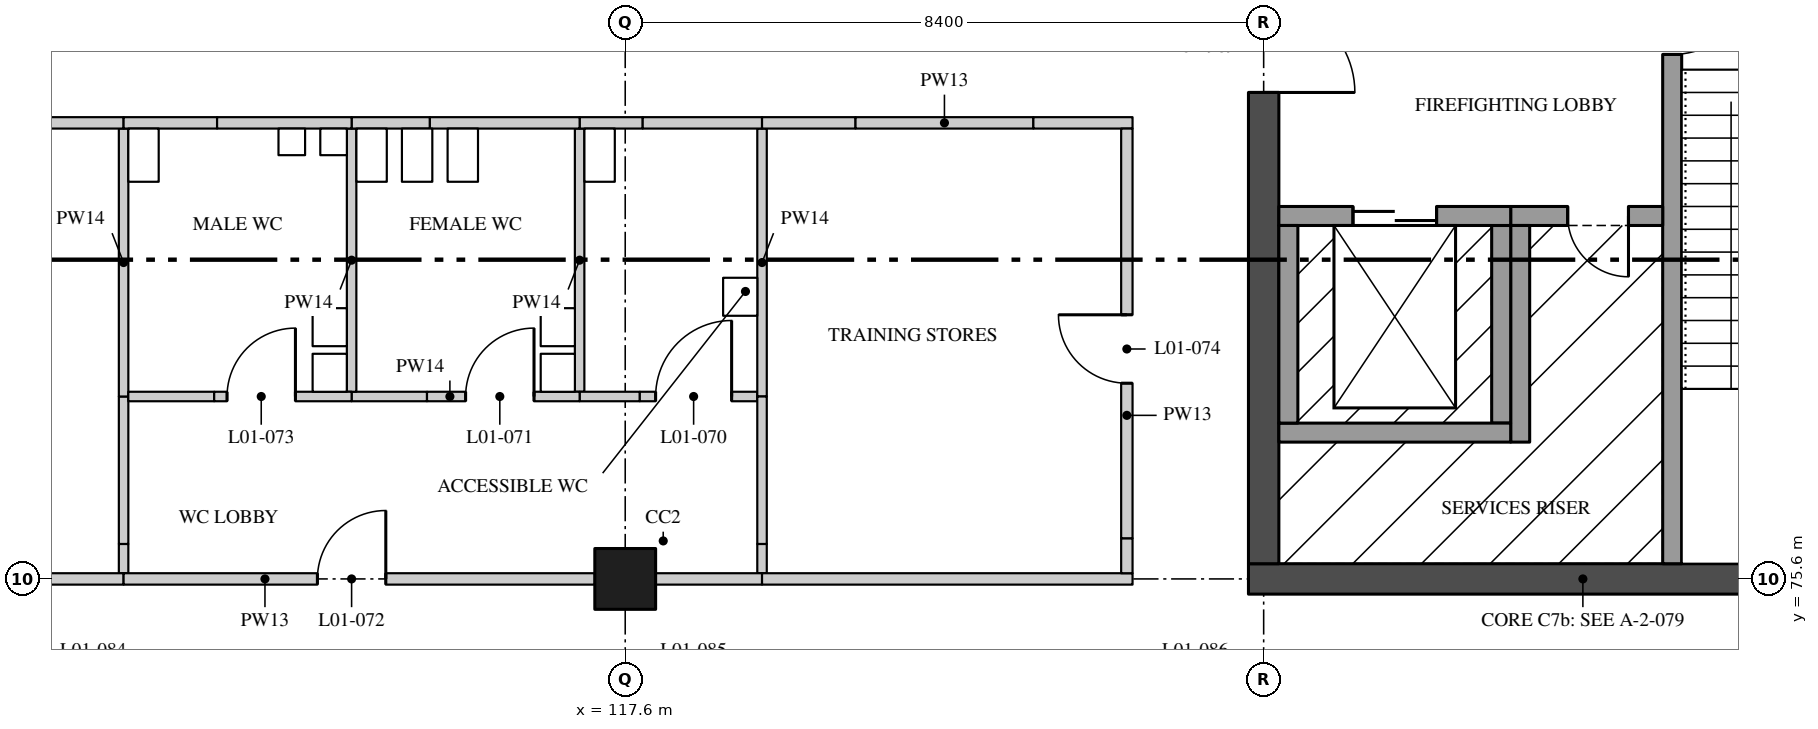
"""IFC4 building model, lengths in metres.
Left out: names, types, materials, properties, quantities, classifications, styles, units other than length and angle.
Written with IfcOpenShell. Run it as: python <this file> out.ifc"""

import sys

from ifc_helpers import new_model, si_unit, direction, frame, frame_2d, origin, origin_2d, place, context, subcontext, project, spatial, rectangle, extrude, element, fill, save


model = new_model("IFC4")
c1 = context("Model", 3, precision=1e-05, world=origin(), true_north=direction((0.0, 1.0)))
c2 = subcontext(c1, "Body", "Model", "MODEL_VIEW")
j1 = project(units=[si_unit("LENGTHUNIT", "METRE"), si_unit("PLANEANGLEUNIT", "RADIAN")], contexts=[c1])
p1 = place(None, origin())
s1 = spatial("IfcSite", under=j1, at=p1, CompositionType="ELEMENT")
p2 = place(p1, origin())
s2 = spatial("IfcBuilding", under=s1, at=p2, CompositionType="ELEMENT")
p3 = place(p2, frame((0.0, 0.0, 5.4)))
s3 = spatial("IfcBuildingStorey", under=s2, at=p3, CompositionType="ELEMENT", Elevation=5.4)
p4 = place(p3, frame((117.6, 75.6, 0.0), z_axis=(0.0, 0.0, 1.0), x_axis=(1.0, 0.0, 0.0)))
e1 = element("IfcColumn", 1, at=p4, inside=s3, PredefinedType="COLUMN", context=c2, shape_type="SweptSolid", body=[
    extrude(rectangle(XDim=0.8, YDim=0.8, at=origin_2d()), origin(), (0.0, 0.0, 1.0), 4.37),
])
p5 = place(p3, frame((125.8, 75.6, 0.0), z_axis=(0.0, 0.0, 1.0), x_axis=(1.0, 0.0, 0.0)))
e2 = element("IfcWall", 2, at=p5, inside=s3, PredefinedType="SHEAR", context=c2, shape_type="SweptSolid", body=[
    extrude(rectangle(XDim=8.8, YDim=0.4, at=frame_2d((4.4, 0.0))), origin(), (0.0, 0.0, 1.0), 4.37),
])
p6 = place(p3, frame((126.0, 75.8, 0.0), z_axis=(0.0, 0.0, 1.0), x_axis=(0.0, 1.0, 0.0)))
e3 = element("IfcWall", 3, at=p6, inside=s3, PredefinedType="SHEAR", context=c2, shape_type="SweptSolid", body=[
    extrude(rectangle(XDim=8.0, YDim=0.4, at=frame_2d((4.0, 0.0))), origin(), (0.0, 0.0, 1.0), 4.37),
])
p7 = place(p6, frame((6.2, 0.0, 0.0)))
e4 = element("IfcOpeningElement", 4, at=p7, cuts=e3, PredefinedType="OPENING", context=c2, shape_type="SweptSolid", body=[
    extrude(rectangle(XDim=1.2, YDim=2.1, at=frame_2d((0.6, 1.05))), frame((0.0, 0.21, 0.0), z_axis=(0.0, -1.0, 0.0), x_axis=(1.0, 0.0, 0.0)), (0.0, 0.0, 1.0), 0.42),
])
p8 = place(p3, frame((131.375, 83.8, 0.0), z_axis=(0.0, 0.0, 1.0), x_axis=(0.0, -1.0, 0.0)))
e5 = element("IfcWall", 5, at=p8, inside=s3, PredefinedType="SOLIDWALL", context=c2, shape_type="SweptSolid", body=[
    extrude(rectangle(XDim=8.0, YDim=0.25, at=frame_2d((4.0, 0.0))), origin(), (0.0, 0.0, 1.0), 4.37),
])
p9 = place(p8, frame((0.2, 0.0, 0.0)))
e6 = element("IfcOpeningElement", 6, at=p9, cuts=e5, PredefinedType="OPENING", context=c2, shape_type="SweptSolid", body=[
    extrude(rectangle(XDim=1.1, YDim=2.1, at=frame_2d((0.55, 1.05))), frame((0.0, 0.135, 0.0), z_axis=(0.0, -1.0, 0.0), x_axis=(1.0, 0.0, 0.0)), (0.0, 0.0, 1.0), 0.27),
])
p10 = place(p3, frame((131.25, 80.375, 0.0), z_axis=(0.0, 0.0, 1.0), x_axis=(-1.0, 0.0, 0.0)))
e7 = element("IfcWall", 7, at=p10, inside=s3, PredefinedType="SOLIDWALL", context=c2, shape_type="SweptSolid", body=[
    extrude(rectangle(XDim=2.0, YDim=0.25, at=frame_2d((1.0, 0.0))), origin(), (0.0, 0.0, 1.0), 4.37),
])
p11 = place(p10, frame((0.45, 0.0, 0.0)))
e8 = element("IfcOpeningElement", 8, at=p11, cuts=e7, PredefinedType="OPENING", context=c2, shape_type="SweptSolid", body=[
    extrude(rectangle(XDim=0.8, YDim=2.1, at=frame_2d((0.4, 1.05))), frame((0.0, 0.135, 0.0), z_axis=(0.0, -1.0, 0.0), x_axis=(1.0, 0.0, 0.0)), (0.0, 0.0, 1.0), 0.27),
])
p12 = place(p3, frame((129.375, 80.25, 0.0), z_axis=(0.0, 0.0, 1.0), x_axis=(0.0, -1.0, 0.0)))
e9 = element("IfcWall", 9, at=p12, inside=s3, PredefinedType="SOLIDWALL", context=c2, shape_type="SweptSolid", body=[
    extrude(rectangle(XDim=2.85, YDim=0.25, at=frame_2d((1.425, 0.0))), origin(), (0.0, 0.0, 1.0), 4.37),
])
p13 = place(p3, frame((129.125, 77.65, 0.0), z_axis=(0.0, 0.0, 1.0), x_axis=(0.0, 1.0, 0.0)))
e10 = element("IfcWall", 10, at=p13, inside=s3, PredefinedType="SOLIDWALL", context=c2, shape_type="SweptSolid", body=[
    extrude(rectangle(XDim=2.6, YDim=0.25, at=frame_2d((1.3, 0.0))), origin(), (0.0, 0.0, 1.0), 4.37),
])
p14 = place(p3, frame((126.2, 80.375, 0.0), z_axis=(0.0, 0.0, 1.0), x_axis=(1.0, 0.0, 0.0)))
e11 = element("IfcWall", 11, at=p14, inside=s3, PredefinedType="SOLIDWALL", context=c2, shape_type="SweptSolid", body=[
    extrude(rectangle(XDim=3.05, YDim=0.25, at=frame_2d((1.525, 0.0))), origin(), (0.0, 0.0, 1.0), 4.37),
])
p15 = place(p14, frame((0.975, 0.0, 0.0)))
e12 = element("IfcOpeningElement", 12, at=p15, cuts=e11, PredefinedType="OPENING", context=c2, shape_type="SweptSolid", body=[
    extrude(rectangle(XDim=1.1, YDim=2.1, at=frame_2d((0.55, 1.05))), frame((0.0, 0.135, 0.0), z_axis=(0.0, -1.0, 0.0), x_axis=(1.0, 0.0, 0.0)), (0.0, 0.0, 1.0), 0.27),
])
p16 = place(p3, frame((126.2, 77.525, 0.0), z_axis=(0.0, 0.0, 1.0), x_axis=(1.0, 0.0, 0.0)))
e13 = element("IfcWall", 13, at=p16, inside=s3, PredefinedType="SOLIDWALL", context=c2, shape_type="SweptSolid", body=[
    extrude(rectangle(XDim=3.05, YDim=0.25, at=frame_2d((1.525, 0.0))), origin(), (0.0, 0.0, 1.0), 4.37),
])
p17 = place(p3, frame((126.325, 77.65, 0.0), z_axis=(0.0, 0.0, 1.0), x_axis=(0.0, 1.0, 0.0)))
e14 = element("IfcWall", 14, at=p17, inside=s3, PredefinedType="SOLIDWALL", context=c2, shape_type="SweptSolid", body=[
    extrude(rectangle(XDim=2.6, YDim=0.25, at=frame_2d((1.3, 0.0))), origin(), (0.0, 0.0, 1.0), 4.37),
])
p18 = place(p3, frame((111.0, 75.675, 0.0), z_axis=(0.0, 0.0, 1.0), x_axis=(0.0, 1.0, 0.0)))
e15 = element("IfcWall", 15, at=p18, inside=s3, PredefinedType="PARTITIONING", context=c2, shape_type="SweptSolid", body=[
    extrude(rectangle(XDim=0.385, YDim=0.125, at=frame_2d((0.192, 0.0))), origin(), (0.0, 0.0, 1.0), 3.746),
])
p19 = place(p3, frame((111.0, 76.06, 0.0), z_axis=(0.0, 0.0, 1.0), x_axis=(0.0, 1.0, 0.0)))
e16 = element("IfcWall", 16, at=p19, inside=s3, PredefinedType="PARTITIONING", context=c2, shape_type="SweptSolid", body=[
    extrude(rectangle(XDim=1.94, YDim=0.125, at=frame_2d((0.97, 0.0))), origin(), (0.0, 0.0, 1.0), 4.37),
])
p20 = place(p3, frame((111.0, 78.0, 0.0), z_axis=(0.0, 0.0, 1.0), x_axis=(0.0, 1.0, 0.0)))
e17 = element("IfcWall", 17, at=p20, inside=s3, PredefinedType="PARTITIONING", context=c2, shape_type="SweptSolid", body=[
    extrude(rectangle(XDim=3.525, YDim=0.125, at=frame_2d((1.762, 0.0))), origin(), (0.0, 0.0, 1.0), 4.37),
])
p21 = place(p3, frame((109.6, 75.6, 0.0), z_axis=(0.0, 0.0, 1.0), x_axis=(1.0, 0.0, 0.0)))
e18 = element("IfcWall", 18, at=p21, inside=s3, PredefinedType="PARTITIONING", context=c2, shape_type="SweptSolid", body=[
    extrude(rectangle(XDim=1.4, YDim=0.15, at=frame_2d((0.7, 0.0))), origin(), (0.0, 0.0, 1.0), 3.746),
])
p22 = place(p3, frame((109.43, 81.6, 0.0), z_axis=(0.0, 0.0, 1.0), x_axis=(1.0, 0.0, 0.0)))
e19 = element("IfcWall", 19, at=p22, inside=s3, PredefinedType="PARTITIONING", context=c2, shape_type="SweptSolid", body=[
    extrude(rectangle(XDim=1.57, YDim=0.15, at=frame_2d((0.785, 0.0))), origin(), (0.0, 0.0, 1.0), 4.37),
])
p23 = place(p3, frame((117.0, 78.062, 0.0), z_axis=(0.0, 0.0, 1.0), x_axis=(0.0, 1.0, 0.0)))
e20 = element("IfcWall", 20, at=p23, inside=s3, PredefinedType="PARTITIONING", context=c2, shape_type="SweptSolid", body=[
    extrude(rectangle(XDim=3.463, YDim=0.125, at=frame_2d((1.731, 0.0))), origin(), (0.0, 0.0, 1.0), 4.37),
])
p24 = place(p3, frame((117.0, 78.0, 0.0), z_axis=(0.0, 0.0, 1.0), x_axis=(1.0, 0.0, 0.0)))
e21 = element("IfcWall", 21, at=p24, inside=s3, PredefinedType="PARTITIONING", context=c2, shape_type="SweptSolid", body=[
    extrude(rectangle(XDim=0.792, YDim=0.125, at=frame_2d((0.396, 0.0))), origin(), (0.0, 0.0, 1.0), 3.746),
])
p25 = place(p3, frame((117.792, 78.0, 0.0), z_axis=(0.0, 0.0, 1.0), x_axis=(1.0, 0.0, 0.0)))
e22 = element("IfcWall", 22, at=p25, inside=s3, PredefinedType="PARTITIONING", context=c2, shape_type="SweptSolid", body=[
    extrude(rectangle(XDim=1.546, YDim=0.125, at=frame_2d((0.773, 0.0))), origin(), (0.0, 0.0, 1.0), 4.37),
])
p26 = place(p25, frame((0.208, 0.0, 0.0)))
e23 = element("IfcOpeningElement", 23, at=p26, cuts=e22, PredefinedType="OPENING", context=c2, shape_type="SweptSolid", body=[
    extrude(rectangle(XDim=1.0, YDim=2.1, at=frame_2d((0.5, 1.05))), frame((0.0, 0.073, 0.0), z_axis=(0.0, -1.0, 0.0), x_axis=(1.0, 0.0, 0.0)), (0.0, 0.0, 1.0), 0.145),
])
p27 = place(p3, frame((119.4, 78.0, 0.0), z_axis=(0.0, 0.0, 1.0), x_axis=(0.0, 1.0, 0.0)))
e24 = element("IfcWall", 24, at=p27, inside=s3, PredefinedType="PARTITIONING", context=c2, shape_type="SweptSolid", body=[
    extrude(rectangle(XDim=3.525, YDim=0.125, at=frame_2d((1.762, 0.0))), origin(), (0.0, 0.0, 1.0), 4.37),
])
p28 = place(p3, frame((117.0, 81.6, 0.0), z_axis=(0.0, 0.0, 1.0), x_axis=(1.0, 0.0, 0.0)))
e25 = element("IfcWall", 25, at=p28, inside=s3, PredefinedType="PARTITIONING", context=c2, shape_type="SweptSolid", body=[
    extrude(rectangle(XDim=0.83, YDim=0.15, at=frame_2d((0.415, 0.0))), origin(), (0.0, 0.0, 1.0), 3.746),
])
p29 = place(p3, frame((117.83, 81.6, 0.0), z_axis=(0.0, 0.0, 1.0), x_axis=(1.0, 0.0, 0.0)))
e26 = element("IfcWall", 26, at=p29, inside=s3, PredefinedType="PARTITIONING", context=c2, shape_type="SweptSolid", body=[
    extrude(rectangle(XDim=1.57, YDim=0.15, at=frame_2d((0.785, 0.0))), origin(), (0.0, 0.0, 1.0), 4.37),
])
p30 = place(p3, frame((114.0, 78.0, 0.0), z_axis=(0.0, 0.0, 1.0), x_axis=(1.0, 0.0, 0.0)))
e27 = element("IfcWall", 27, at=p30, inside=s3, PredefinedType="PARTITIONING", context=c2, shape_type="SweptSolid", body=[
    extrude(rectangle(XDim=0.992, YDim=0.125, at=frame_2d((0.496, 0.0))), origin(), (0.0, 0.0, 1.0), 3.895),
])
p31 = place(p3, frame((114.992, 78.0, 0.0), z_axis=(0.0, 0.0, 1.0), x_axis=(1.0, 0.0, 0.0)))
e28 = element("IfcWall", 28, at=p31, inside=s3, PredefinedType="PARTITIONING", context=c2, shape_type="SweptSolid", body=[
    extrude(rectangle(XDim=2.008, YDim=0.125, at=frame_2d((1.004, 0.0))), origin(), (0.0, 0.0, 1.0), 4.37),
])
p32 = place(p31, frame((0.508, 0.0, 0.0)))
e29 = element("IfcOpeningElement", 29, at=p32, cuts=e28, PredefinedType="OPENING", context=c2, shape_type="SweptSolid", body=[
    extrude(rectangle(XDim=0.9, YDim=2.1, at=frame_2d((0.45, 1.05))), frame((0.0, 0.073, 0.0), z_axis=(0.0, -1.0, 0.0), x_axis=(1.0, 0.0, 0.0)), (0.0, 0.0, 1.0), 0.145),
])
p33 = place(p3, frame((114.0, 78.062, 0.0), z_axis=(0.0, 0.0, 1.0), x_axis=(0.0, 1.0, 0.0)))
e30 = element("IfcWall", 30, at=p33, inside=s3, PredefinedType="PARTITIONING", context=c2, shape_type="SweptSolid", body=[
    extrude(rectangle(XDim=3.463, YDim=0.125, at=frame_2d((1.731, 0.0))), origin(), (0.0, 0.0, 1.0), 4.37),
])
p34 = place(p3, frame((114.0, 81.6, 0.0), z_axis=(0.0, 0.0, 1.0), x_axis=(1.0, 0.0, 0.0)))
e31 = element("IfcWall", 31, at=p34, inside=s3, PredefinedType="PARTITIONING", context=c2, shape_type="SweptSolid", body=[
    extrude(rectangle(XDim=1.03, YDim=0.15, at=frame_2d((0.515, 0.0))), origin(), (0.0, 0.0, 1.0), 3.895),
])
p35 = place(p3, frame((115.03, 81.6, 0.0), z_axis=(0.0, 0.0, 1.0), x_axis=(1.0, 0.0, 0.0)))
e32 = element("IfcWall", 32, at=p35, inside=s3, PredefinedType="PARTITIONING", context=c2, shape_type="SweptSolid", body=[
    extrude(rectangle(XDim=1.97, YDim=0.15, at=frame_2d((0.985, 0.0))), origin(), (0.0, 0.0, 1.0), 4.37),
])
p36 = place(p3, frame((111.062, 78.0, 0.0), z_axis=(0.0, 0.0, 1.0), x_axis=(1.0, 0.0, 0.0)))
e33 = element("IfcWall", 33, at=p36, inside=s3, PredefinedType="PARTITIONING", context=c2, shape_type="SweptSolid", body=[
    extrude(rectangle(XDim=1.13, YDim=0.125, at=frame_2d((0.565, 0.0))), origin(), (0.0, 0.0, 1.0), 3.895),
])
p37 = place(p3, frame((112.192, 78.0, 0.0), z_axis=(0.0, 0.0, 1.0), x_axis=(1.0, 0.0, 0.0)))
e34 = element("IfcWall", 34, at=p37, inside=s3, PredefinedType="PARTITIONING", context=c2, shape_type="SweptSolid", body=[
    extrude(rectangle(XDim=1.808, YDim=0.125, at=frame_2d((0.904, 0.0))), origin(), (0.0, 0.0, 1.0), 4.37),
])
p38 = place(p37, frame((0.169, 0.0, 0.0)))
e35 = element("IfcOpeningElement", 35, at=p38, cuts=e34, PredefinedType="OPENING", context=c2, shape_type="SweptSolid", body=[
    extrude(rectangle(XDim=0.9, YDim=2.1, at=frame_2d((0.45, 1.05))), frame((0.0, 0.073, 0.0), z_axis=(0.0, -1.0, 0.0), x_axis=(1.0, 0.0, 0.0)), (0.0, 0.0, 1.0), 0.145),
])
p39 = place(p3, frame((119.4, 75.675, 0.0), z_axis=(0.0, 0.0, 1.0), x_axis=(0.0, 1.0, 0.0)))
e36 = element("IfcWall", 36, at=p39, inside=s3, PredefinedType="PARTITIONING", context=c2, shape_type="SweptSolid", body=[
    extrude(rectangle(XDim=0.385, YDim=0.125, at=frame_2d((0.192, 0.0))), origin(), (0.0, 0.0, 1.0), 3.746),
])
p40 = place(p3, frame((119.4, 76.06, 0.0), z_axis=(0.0, 0.0, 1.0), x_axis=(0.0, 1.0, 0.0)))
e37 = element("IfcWall", 37, at=p40, inside=s3, PredefinedType="PARTITIONING", context=c2, shape_type="SweptSolid", body=[
    extrude(rectangle(XDim=1.94, YDim=0.125, at=frame_2d((0.97, 0.0))), origin(), (0.0, 0.0, 1.0), 4.37),
])
p41 = place(p3, frame((111.0, 75.6, 0.0), z_axis=(0.0, 0.0, 1.0), x_axis=(1.0, 0.0, 0.0)))
e38 = element("IfcWall", 38, at=p41, inside=s3, PredefinedType="PARTITIONING", context=c2, shape_type="SweptSolid", body=[
    extrude(rectangle(XDim=6.2, YDim=0.15, at=frame_2d((3.1, 0.0))), origin(), (0.0, 0.0, 1.0), 3.746),
])
p42 = place(p41, frame((2.55, 0.0, 0.0)))
e39 = element("IfcOpeningElement", 39, at=p42, cuts=e38, PredefinedType="OPENING", context=c2, shape_type="SweptSolid", body=[
    extrude(rectangle(XDim=0.9, YDim=2.1, at=frame_2d((0.45, 1.05))), frame((0.0, 0.085, 0.0), z_axis=(0.0, -1.0, 0.0), x_axis=(1.0, 0.0, 0.0)), (0.0, 0.0, 1.0), 0.17),
])
p43 = place(p3, frame((118.0, 75.6, 0.0), z_axis=(0.0, 0.0, 1.0), x_axis=(1.0, 0.0, 0.0)))
e40 = element("IfcWall", 40, at=p43, inside=s3, PredefinedType="PARTITIONING", context=c2, shape_type="SweptSolid", body=[
    extrude(rectangle(XDim=1.4, YDim=0.15, at=frame_2d((0.7, 0.0))), origin(), (0.0, 0.0, 1.0), 3.746),
])
p44 = place(p3, frame((111.0, 81.6, 0.0), z_axis=(0.0, 0.0, 1.0), x_axis=(1.0, 0.0, 0.0)))
e41 = element("IfcWall", 41, at=p44, inside=s3, PredefinedType="PARTITIONING", context=c2, shape_type="SweptSolid", body=[
    extrude(rectangle(XDim=1.23, YDim=0.15, at=frame_2d((0.615, 0.0))), origin(), (0.0, 0.0, 1.0), 3.895),
])
p45 = place(p3, frame((112.23, 81.6, 0.0), z_axis=(0.0, 0.0, 1.0), x_axis=(1.0, 0.0, 0.0)))
e42 = element("IfcWall", 42, at=p45, inside=s3, PredefinedType="PARTITIONING", context=c2, shape_type="SweptSolid", body=[
    extrude(rectangle(XDim=1.77, YDim=0.15, at=frame_2d((0.885, 0.0))), origin(), (0.0, 0.0, 1.0), 4.37),
])
p46 = place(p3, frame((119.4, 75.6, 0.0), z_axis=(0.0, 0.0, 1.0), x_axis=(1.0, 0.0, 0.0)))
e43 = element("IfcWall", 43, at=p46, inside=s3, PredefinedType="PARTITIONING", context=c2, shape_type="SweptSolid", body=[
    extrude(rectangle(XDim=4.875, YDim=0.15, at=frame_2d((2.438, 0.0))), origin(), (0.0, 0.0, 1.0), 3.746),
])
p47 = place(p3, frame((119.4, 81.6, 0.0), z_axis=(0.0, 0.0, 1.0), x_axis=(1.0, 0.0, 0.0)))
e44 = element("IfcWall", 44, at=p47, inside=s3, PredefinedType="PARTITIONING", context=c2, shape_type="SweptSolid", body=[
    extrude(rectangle(XDim=1.23, YDim=0.15, at=frame_2d((0.615, 0.0))), origin(), (0.0, 0.0, 1.0), 3.895),
])
p48 = place(p3, frame((120.63, 81.6, 0.0), z_axis=(0.0, 0.0, 1.0), x_axis=(1.0, 0.0, 0.0)))
e45 = element("IfcWall", 45, at=p48, inside=s3, PredefinedType="PARTITIONING", context=c2, shape_type="SweptSolid", body=[
    extrude(rectangle(XDim=2.34, YDim=0.15, at=frame_2d((1.17, 0.0))), origin(), (0.0, 0.0, 1.0), 4.37),
])
p49 = place(p3, frame((122.97, 81.6, 0.0), z_axis=(0.0, 0.0, 1.0), x_axis=(1.0, 0.0, 0.0)))
e46 = element("IfcWall", 46, at=p49, inside=s3, PredefinedType="PARTITIONING", context=c2, shape_type="SweptSolid", body=[
    extrude(rectangle(XDim=1.305, YDim=0.15, at=frame_2d((0.652, 0.0))), origin(), (0.0, 0.0, 1.0), 3.895),
])
p50 = place(p3, frame((124.2, 75.675, 0.0), z_axis=(0.0, 0.0, 1.0), x_axis=(0.0, 1.0, 0.0)))
e47 = element("IfcWall", 47, at=p50, inside=s3, PredefinedType="PARTITIONING", context=c2, shape_type="SweptSolid", body=[
    extrude(rectangle(XDim=0.46, YDim=0.15, at=frame_2d((0.23, 0.0))), origin(), (0.0, 0.0, 1.0), 3.746),
])
p51 = place(p3, frame((124.2, 76.135, 0.0), z_axis=(0.0, 0.0, 1.0), x_axis=(0.0, 1.0, 0.0)))
e48 = element("IfcWall", 48, at=p51, inside=s3, PredefinedType="PARTITIONING", context=c2, shape_type="SweptSolid", body=[
    extrude(rectangle(XDim=5.39, YDim=0.15, at=frame_2d((2.695, 0.0))), origin(), (0.0, 0.0, 1.0), 4.37),
])
p52 = place(p51, frame((2.04, 0.0, 0.0)))
e49 = element("IfcOpeningElement", 49, at=p52, cuts=e48, PredefinedType="OPENING", context=c2, shape_type="SweptSolid", body=[
    extrude(rectangle(XDim=0.9, YDim=2.1, at=frame_2d((0.45, 1.05))), frame((0.0, 0.085, 0.0), z_axis=(0.0, -1.0, 0.0), x_axis=(1.0, 0.0, 0.0)), (0.0, 0.0, 1.0), 0.17),
])
p53 = place(p7, frame((1.2, 0.0, 0.0), z_axis=(0.0, 0.0, 1.0), x_axis=(-1.0, 0.0, 0.0)))
e50 = element("IfcDoor", 50, at=p53, inside=s3, OperationType="SINGLE_SWING_LEFT", PredefinedType="DOOR", context=c2, shape_type="SweptSolid", body=[
    extrude(rectangle(XDim=1.2, YDim=2.1, at=frame_2d((0.6, 1.05))), frame((0.0, 0.035, 0.0), z_axis=(0.0, -1.0, 0.0), x_axis=(1.0, 0.0, 0.0)), (0.0, 0.0, 1.0), 0.07),
])
fill(e4, e50)
p54 = place(p11, origin())
e51 = element("IfcDoor", 51, at=p54, inside=s3, OperationType="SINGLE_SWING_RIGHT", PredefinedType="DOOR", context=c2, shape_type="SweptSolid", body=[
    extrude(rectangle(XDim=0.8, YDim=2.1, at=frame_2d((0.4, 1.05))), frame((0.0, 0.035, 0.0), z_axis=(0.0, -1.0, 0.0), x_axis=(1.0, 0.0, 0.0)), (0.0, 0.0, 1.0), 0.07),
])
fill(e8, e51)
p55 = place(p9, origin())
e52 = element("IfcDoor", 52, at=p55, inside=s3, OperationType="SINGLE_SWING_RIGHT", PredefinedType="DOOR", context=c2, shape_type="SweptSolid", body=[
    extrude(rectangle(XDim=1.1, YDim=2.1, at=frame_2d((0.55, 1.05))), frame((0.0, 0.035, 0.0), z_axis=(0.0, -1.0, 0.0), x_axis=(1.0, 0.0, 0.0)), (0.0, 0.0, 1.0), 0.07),
])
fill(e6, e52)
p56 = place(p15, origin())
e53 = element("IfcDoor", 53, at=p56, inside=s3, OperationType="DOUBLE_DOOR_SLIDING", PredefinedType="DOOR", context=c2, shape_type="SweptSolid", body=[
    extrude(rectangle(XDim=1.1, YDim=2.1, at=frame_2d((0.55, 1.05))), frame((0.0, 0.04, 0.0), z_axis=(0.0, -1.0, 0.0), x_axis=(1.0, 0.0, 0.0)), (0.0, 0.0, 1.0), 0.08),
])
fill(e12, e53)
p57 = place(p26, origin())
e54 = element("IfcDoor", 54, at=p57, inside=s3, OperationType="SINGLE_SWING_LEFT", PredefinedType="DOOR", context=c2, shape_type="SweptSolid", body=[
    extrude(rectangle(XDim=1.0, YDim=2.1, at=frame_2d((0.5, 1.05))), frame((0.0, 0.02, 0.0), z_axis=(0.0, -1.0, 0.0), x_axis=(1.0, 0.0, 0.0)), (0.0, 0.0, 1.0), 0.04),
])
fill(e23, e54)
p58 = place(p32, origin())
e55 = element("IfcDoor", 55, at=p58, inside=s3, OperationType="SINGLE_SWING_LEFT", PredefinedType="DOOR", context=c2, shape_type="SweptSolid", body=[
    extrude(rectangle(XDim=0.9, YDim=2.1, at=frame_2d((0.45, 1.05))), frame((0.0, 0.02, 0.0), z_axis=(0.0, -1.0, 0.0), x_axis=(1.0, 0.0, 0.0)), (0.0, 0.0, 1.0), 0.04),
])
fill(e29, e55)
p59 = place(p42, origin())
e56 = element("IfcDoor", 56, at=p59, inside=s3, OperationType="SINGLE_SWING_LEFT", PredefinedType="DOOR", context=c2, shape_type="SweptSolid", body=[
    extrude(rectangle(XDim=0.9, YDim=2.1, at=frame_2d((0.45, 1.05))), frame((0.0, 0.025, 0.0), z_axis=(0.0, -1.0, 0.0), x_axis=(1.0, 0.0, 0.0)), (0.0, 0.0, 1.0), 0.05),
])
fill(e39, e56)
p60 = place(p38, origin())
e57 = element("IfcDoor", 57, at=p60, inside=s3, OperationType="SINGLE_SWING_LEFT", PredefinedType="DOOR", context=c2, shape_type="SweptSolid", body=[
    extrude(rectangle(XDim=0.9, YDim=2.1, at=frame_2d((0.45, 1.05))), frame((0.0, 0.02, 0.0), z_axis=(0.0, -1.0, 0.0), x_axis=(1.0, 0.0, 0.0)), (0.0, 0.0, 1.0), 0.04),
])
fill(e35, e57)
p61 = place(p52, origin())
e58 = element("IfcDoor", 58, at=p61, inside=s3, OperationType="SINGLE_SWING_LEFT", PredefinedType="DOOR", context=c2, shape_type="SweptSolid", body=[
    extrude(rectangle(XDim=0.9, YDim=2.1, at=frame_2d((0.45, 1.05))), frame((0.0, 0.025, 0.0), z_axis=(0.0, -1.0, 0.0), x_axis=(1.0, 0.0, 0.0)), (0.0, 0.0, 1.0), 0.05),
])
fill(e49, e58)
save(model, sys.argv[1])
